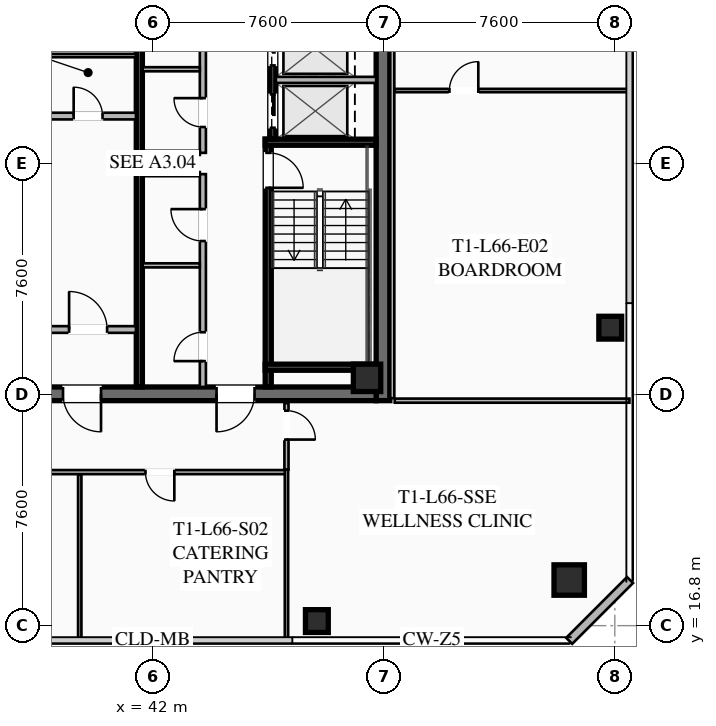
"""IFC4 building model, lengths in metres.
Left out: names, types, materials, properties, quantities, classifications, styles, units other than length and angle.
Written with IfcOpenShell. Run it as: python <this file> out.ifc"""

import sys

from ifc_helpers import new_model, si_unit, direction, frame, frame_2d, origin, origin_2d, place, context, subcontext, project, spatial, rectangle, hollow_rectangle, extrude, element, fill, save


model = new_model("IFC4")
c1 = context("Model", 3, precision=1e-05, world=origin(), true_north=direction((0.0, 1.0)))
c2 = subcontext(c1, "Body", "Model", "MODEL_VIEW")
j1 = project(units=[si_unit("LENGTHUNIT", "METRE"), si_unit("PLANEANGLEUNIT", "RADIAN")], contexts=[c1])
p1 = place(None, origin())
s1 = spatial("IfcSite", under=j1, at=p1, CompositionType="ELEMENT")
p2 = place(p1, origin())
s2 = spatial("IfcBuilding", under=s1, at=p2, CompositionType="ELEMENT")
p3 = place(p2, frame((0.0, 0.0, 243.25)))
s3 = spatial("IfcBuildingStorey", under=s2, at=p3, CompositionType="ELEMENT", Elevation=243.25)
p4 = place(p3, frame((49.575, 39.8, 0.0), z_axis=(0.0, 0.0, 1.0), x_axis=(0.0, -1.0, 0.0)))
e1 = element("IfcWall", 1, at=p4, inside=s3, PredefinedType="SHEAR", context=c2, shape_type="SweptSolid", body=[
    extrude(rectangle(XDim=15.6, YDim=0.45, at=frame_2d((7.8, 0.0))), origin(), (0.0, 0.0, 1.0), 3.55),
])
p5 = place(p3, frame((49.35, 24.425, 0.0), z_axis=(0.0, 0.0, 1.0), x_axis=(-1.0, 0.0, 0.0)))
e2 = element("IfcWall", 2, at=p5, inside=s3, PredefinedType="SHEAR", context=c2, shape_type="SweptSolid", body=[
    extrude(rectangle(XDim=14.7, YDim=0.45, at=frame_2d((7.35, 0.0))), origin(), (0.0, 0.0, 1.0), 3.55),
])
p6 = place(p5, frame((9.05, 0.0, 0.0)))
e3 = element("IfcOpeningElement", 3, at=p6, cuts=e2, PredefinedType="OPENING", context=c2, shape_type="SweptSolid", body=[
    extrude(rectangle(XDim=1.25, YDim=2.25, at=frame_2d((0.625, 1.125))), frame((0.0, 0.235, 0.0), z_axis=(0.0, -1.0, 0.0), x_axis=(1.0, 0.0, 0.0)), (0.0, 0.0, 1.0), 0.47),
])
p7 = place(p5, frame((4.0, 0.0, 0.0)))
e4 = element("IfcOpeningElement", 4, at=p7, cuts=e2, PredefinedType="OPENING", context=c2, shape_type="SweptSolid", body=[
    extrude(rectangle(XDim=1.25, YDim=2.25, at=frame_2d((0.625, 1.125))), frame((0.0, 0.235, 0.0), z_axis=(0.0, -1.0, 0.0), x_axis=(1.0, 0.0, 0.0)), (0.0, 0.0, 1.0), 0.47),
])
p8 = place(p3, frame((49.05, 24.95, 0.0), z_axis=(0.0, 0.0, 1.0), x_axis=(1.0, 0.0, 0.0)))
e5 = element("IfcColumn", 5, at=p8, inside=s3, PredefinedType="COLUMN", context=c2, shape_type="SweptSolid", body=[
    extrude(hollow_rectangle(XDim=0.9, YDim=0.9, WallThickness=0.04, at=origin_2d()), origin(), (0.0, 0.0, 1.0), 3.25),
])
p9 = place(p3, frame((55.7, 18.3, 0.0), z_axis=(0.0, 0.0, 1.0), x_axis=(1.0, 0.0, 0.0)))
e6 = element("IfcColumn", 6, at=p9, inside=s3, PredefinedType="COLUMN", context=c2, shape_type="SweptSolid", body=[
    extrude(hollow_rectangle(XDim=1.0, YDim=1.0, WallThickness=0.04, at=origin_2d()), origin(), (0.0, 0.0, 1.0), 3.25),
])
for number, where, z_axis, x_axis in (
    (7, (47.4, 16.95, 0.0), (0.0, 0.0, 1.0), (1.0, 0.0, 0.0)),
    (8, (57.05, 26.6, 0.0), (0.0, 0.0, 1.0), (1.0, 0.0, 0.0)),
):
    element("IfcColumn", number, at=place(p3, frame(where, z_axis=z_axis, x_axis=x_axis)), inside=s3, PredefinedType="COLUMN", context=c2, shape_type="SweptSolid", body=[
        extrude(hollow_rectangle(XDim=0.75, YDim=0.75, WallThickness=0.032, at=origin_2d()), origin(), (0.0, 0.0, 1.0), 3.25),
    ])
p10 = place(p3, frame((57.7, 18.3, 0.0), z_axis=(0.0, 0.0, 1.0), x_axis=(-0.707106781187, -0.707106781187, 0.0)))
e9 = element("IfcWall", 9, at=p10, inside=s3, PredefinedType="SOLIDWALL", context=c2, shape_type="SweptSolid", body=[
    extrude(rectangle(XDim=2.828, YDim=0.28, at=frame_2d((1.414, 0.0))), origin(), (0.0, 0.0, 1.0), 3.25),
])
p11 = place(p3, frame((45.8, 32.8, 0.0), z_axis=(0.0, 0.0, 1.0), x_axis=(0.0, -1.0, 0.0)))
e10 = element("IfcWall", 10, at=p11, inside=s3, PredefinedType="SHEAR", context=c2, shape_type="SweptSolid", body=[
    extrude(rectangle(XDim=8.15, YDim=0.2, at=frame_2d((4.075, 0.0))), origin(), (0.0, 0.0, 1.0), 3.25),
])
p12 = place(p11, frame((0.45, 0.0, 0.0)))
e11 = element("IfcOpeningElement", 11, at=p12, cuts=e10, PredefinedType="OPENING", context=c2, shape_type="SweptSolid", body=[
    extrude(rectangle(XDim=1.15, YDim=2.2, at=frame_2d((0.575, 1.1))), frame((0.0, 0.11, 0.0), z_axis=(0.0, -1.0, 0.0), x_axis=(1.0, 0.0, 0.0)), (0.0, 0.0, 1.0), 0.22),
])
for number, where, z_axis, x_axis in (
    (12, (45.7, 32.7, 0.0), (0.0, 0.0, 1.0), (1.0, 0.0, 0.0)),
    (13, (45.7, 25.3, 0.0), (0.0, 0.0, 1.0), (1.0, 0.0, 0.0)),
):
    element("IfcWall", number, at=place(p3, frame(where, z_axis=z_axis, x_axis=x_axis)), inside=s3, PredefinedType="SHEAR", context=c2, shape_type="SweptSolid", body=[
        extrude(rectangle(XDim=3.65, YDim=0.2, at=frame_2d((1.825, 0.0))), origin(), (0.0, 0.0, 1.0), 3.25),
    ])
p13 = place(p3, frame((41.56, 24.65, 0.0), z_axis=(0.0, 0.0, 1.0), x_axis=(0.0, 1.0, 0.0)))
e14 = element("IfcWall", 14, at=p13, inside=s3, PredefinedType="SHEAR", context=c2, shape_type="SweptSolid", body=[
    extrude(rectangle(XDim=14.7, YDim=0.2, at=frame_2d((7.35, 0.0))), origin(), (0.0, 0.0, 1.0), 3.25),
])
p14 = place(p3, frame((38.3, 33.56, 0.0), z_axis=(0.0, 0.0, 1.0), x_axis=(1.0, 0.0, 0.0)))
e15 = element("IfcWall", 15, at=p14, inside=s3, PredefinedType="SOLIDWALL", context=c2, shape_type="SweptSolid", body=[
    extrude(rectangle(XDim=3.15, YDim=0.22, at=frame_2d((1.575, 0.0))), origin(), (0.0, 0.0, 1.0), 2.393),
])
p15 = place(p14, frame((1.1, 0.0, 0.0)))
e16 = element("IfcOpeningElement", 16, at=p15, cuts=e15, PredefinedType="OPENING", context=c2, shape_type="SweptSolid", body=[
    extrude(rectangle(XDim=0.95, YDim=2.05, at=frame_2d((0.475, 1.025))), frame((0.0, 0.12, 0.0), z_axis=(0.0, -1.0, 0.0), x_axis=(1.0, 0.0, 0.0)), (0.0, 0.0, 1.0), 0.24),
])
p16 = place(p3, frame((38.3, 26.54, 0.0), z_axis=(0.0, 0.0, 1.0), x_axis=(1.0, 0.0, 0.0)))
e17 = element("IfcWall", 17, at=p16, inside=s3, PredefinedType="SOLIDWALL", context=c2, shape_type="SweptSolid", body=[
    extrude(rectangle(XDim=3.15, YDim=0.22, at=frame_2d((1.575, 0.0))), origin(), (0.0, 0.0, 1.0), 2.393),
])
p17 = place(p16, frame((0.95, 0.0, 0.0)))
e18 = element("IfcOpeningElement", 18, at=p17, cuts=e17, PredefinedType="OPENING", context=c2, shape_type="SweptSolid", body=[
    extrude(rectangle(XDim=1.25, YDim=2.25, at=frame_2d((0.625, 1.125))), frame((0.0, 0.12, 0.0), z_axis=(0.0, -1.0, 0.0), x_axis=(1.0, 0.0, 0.0)), (0.0, 0.0, 1.0), 0.24),
])
p18 = place(p3, frame((45.95, 39.35, 0.0), z_axis=(0.0, 0.0, 1.0), x_axis=(0.0, -1.0, 0.0)))
e19 = element("IfcWall", 19, at=p18, inside=s3, PredefinedType="SHEAR", context=c2, shape_type="SweptSolid", body=[
    extrude(rectangle(XDim=6.55, YDim=0.2, at=frame_2d((3.275, 0.0))), origin(), (0.0, 0.0, 1.0), 3.25),
])
p19 = place(p18, frame((5.075, 0.0, 0.0)))
e20 = element("IfcOpeningElement", 20, at=p19, cuts=e19, PredefinedType="OPENING", context=c2, shape_type="SweptSolid", body=[
    extrude(rectangle(XDim=1.1, YDim=2.2, at=frame_2d((0.55, 1.1))), frame((0.0, 0.11, 0.0), z_axis=(0.0, -1.0, 0.0), x_axis=(1.0, 0.0, 0.0)), (0.0, 0.0, 1.0), 0.22),
])
p20 = place(p18, frame((3.025, 0.0, 0.0)))
e21 = element("IfcOpeningElement", 21, at=p20, cuts=e19, PredefinedType="OPENING", context=c2, shape_type="SweptSolid", body=[
    extrude(rectangle(XDim=1.1, YDim=2.2, at=frame_2d((0.55, 1.1))), frame((0.0, 0.11, 0.0), z_axis=(0.0, -1.0, 0.0), x_axis=(1.0, 0.0, 0.0)), (0.0, 0.0, 1.0), 0.22),
])
p21 = place(p18, frame((1.025, 0.0, 0.0)))
e22 = element("IfcOpeningElement", 22, at=p21, cuts=e19, PredefinedType="OPENING", context=c2, shape_type="SweptSolid", body=[
    extrude(rectangle(XDim=1.1, YDim=2.2, at=frame_2d((0.55, 1.1))), frame((0.0, 0.11, 0.0), z_axis=(0.0, -1.0, 0.0), x_axis=(1.0, 0.0, 0.0)), (0.0, 0.0, 1.0), 0.22),
])
p22 = place(p3, frame((46.05, 34.75, 0.0), z_axis=(0.0, 0.0, 1.0), x_axis=(1.0, 0.0, 0.0)))
e23 = element("IfcWall", 23, at=p22, inside=s3, PredefinedType="SOLIDWALL", context=c2, shape_type="SweptSolid", body=[
    extrude(rectangle(XDim=3.3, YDim=0.2, at=frame_2d((1.65, 0.0))), origin(), (0.0, 0.0, 1.0), 3.25),
])
p23 = place(p3, frame((38.3, 35.55, 0.0), z_axis=(0.0, 0.0, 1.0), x_axis=(1.0, 0.0, 0.0)))
e24 = element("IfcWall", 24, at=p23, inside=s3, PredefinedType="PARTITIONING", context=c2, shape_type="SweptSolid", body=[
    extrude(rectangle(XDim=3.15, YDim=0.11, at=frame_2d((1.575, 0.0))), origin(), (0.0, 0.0, 1.0), 2.393),
])
p24 = place(p3, frame((43.65, 24.65, 0.0), z_axis=(0.0, 0.0, 1.0), x_axis=(0.0, 1.0, 0.0)))
e25 = element("IfcWall", 25, at=p24, inside=s3, PredefinedType="SOLIDWALL", context=c2, shape_type="SweptSolid", body=[
    extrude(rectangle(XDim=7.0, YDim=0.2, at=frame_2d((3.5, 0.0))), origin(), (0.0, 0.0, 1.0), 2.393),
])
p25 = place(p24, frame((0.85, 0.0, 0.0)))
e26 = element("IfcOpeningElement", 26, at=p25, cuts=e25, PredefinedType="OPENING", context=c2, shape_type="SweptSolid", body=[
    extrude(rectangle(XDim=0.95, YDim=2.05, at=frame_2d((0.475, 1.025))), frame((0.0, 0.11, 0.0), z_axis=(0.0, -1.0, 0.0), x_axis=(1.0, 0.0, 0.0)), (0.0, 0.0, 1.0), 0.22),
])
p26 = place(p24, frame((4.8, 0.0, 0.0)))
e27 = element("IfcOpeningElement", 27, at=p26, cuts=e25, PredefinedType="OPENING", context=c2, shape_type="SweptSolid", body=[
    extrude(rectangle(XDim=1.05, YDim=2.2, at=frame_2d((0.525, 1.1))), frame((0.0, 0.11, 0.0), z_axis=(0.0, -1.0, 0.0), x_axis=(1.0, 0.0, 0.0)), (0.0, 0.0, 1.0), 0.22),
])
for number, where, z_axis, x_axis in (
    (28, (41.67, 31.65, 0.0), (0.0, 0.0, 1.0), (1.0, 0.0, 0.0)),
    (29, (41.67, 28.65, 0.0), (0.0, 0.0, 1.0), (1.0, 0.0, 0.0)),
):
    element("IfcWall", number, at=place(p3, frame(where, z_axis=z_axis, x_axis=x_axis)), inside=s3, PredefinedType="PARTITIONING", context=c2, shape_type="SweptSolid", body=[
        extrude(rectangle(XDim=1.88, YDim=0.135, at=frame_2d((0.94, 0.0))), origin(), (0.0, 0.0, 1.0), 2.393),
    ])
p27 = place(p3, frame((43.65, 32.35, 0.0), z_axis=(0.0, 0.0, 1.0), x_axis=(0.0, 1.0, 0.0)))
e30 = element("IfcWall", 30, at=p27, inside=s3, PredefinedType="SOLIDWALL", context=c2, shape_type="SweptSolid", body=[
    extrude(rectangle(XDim=7.0, YDim=0.2, at=frame_2d((3.5, 0.0))), origin(), (0.0, 0.0, 1.0), 2.393),
])
p28 = place(p27, frame((0.85, 0.0, 0.0)))
e31 = element("IfcOpeningElement", 31, at=p28, cuts=e30, PredefinedType="OPENING", context=c2, shape_type="SweptSolid", body=[
    extrude(rectangle(XDim=0.95, YDim=2.05, at=frame_2d((0.475, 1.025))), frame((0.0, 0.11, 0.0), z_axis=(0.0, -1.0, 0.0), x_axis=(1.0, 0.0, 0.0)), (0.0, 0.0, 1.0), 0.22),
])
p29 = place(p27, frame((4.85, 0.0, 0.0)))
e32 = element("IfcOpeningElement", 32, at=p29, cuts=e30, PredefinedType="OPENING", context=c2, shape_type="SweptSolid", body=[
    extrude(rectangle(XDim=0.95, YDim=2.05, at=frame_2d((0.475, 1.025))), frame((0.0, 0.11, 0.0), z_axis=(0.0, -1.0, 0.0), x_axis=(1.0, 0.0, 0.0)), (0.0, 0.0, 1.0), 0.22),
])
for number, where, z_axis, x_axis in (
    (33, (41.67, 32.35, 0.0), (0.0, 0.0, 1.0), (1.0, 0.0, 0.0)),
    (34, (41.67, 35.1, 0.0), (0.0, 0.0, 1.0), (1.0, 0.0, 0.0)),
):
    element("IfcWall", number, at=place(p3, frame(where, z_axis=z_axis, x_axis=x_axis)), inside=s3, PredefinedType="PARTITIONING", context=c2, shape_type="SweptSolid", body=[
        extrude(rectangle(XDim=1.88, YDim=0.135, at=frame_2d((0.94, 0.0))), origin(), (0.0, 0.0, 1.0), 2.393),
    ])
p30 = place(p3, frame((46.4, 21.85, 0.0), z_axis=(0.0, 0.0, 1.0), x_axis=(-1.0, 0.0, 0.0)))
e35 = element("IfcWall", 35, at=p30, inside=s3, PredefinedType="PARTITIONING", context=c2, shape_type="SweptSolid", body=[
    extrude(rectangle(XDim=17.95, YDim=0.135, at=frame_2d((8.975, 0.0))), origin(), (0.0, 0.0, 1.0), 2.393),
])
p31 = place(p30, frame((16.62, 0.0, 0.0)))
e36 = element("IfcOpeningElement", 36, at=p31, cuts=e35, PredefinedType="OPENING", context=c2, shape_type="SweptSolid", body=[
    extrude(rectangle(XDim=0.95, YDim=2.05, at=frame_2d((0.475, 1.025))), frame((0.0, 0.077, 0.0), z_axis=(0.0, -1.0, 0.0), x_axis=(1.0, 0.0, 0.0)), (0.0, 0.0, 1.0), 0.155),
])
p32 = place(p30, frame((3.688, 0.0, 0.0)))
e37 = element("IfcOpeningElement", 37, at=p32, cuts=e35, PredefinedType="OPENING", context=c2, shape_type="SweptSolid", body=[
    extrude(rectangle(XDim=0.95, YDim=2.05, at=frame_2d((0.475, 1.025))), frame((0.0, 0.077, 0.0), z_axis=(0.0, -1.0, 0.0), x_axis=(1.0, 0.0, 0.0)), (0.0, 0.0, 1.0), 0.155),
])
p33 = place(p3, frame((46.4, 24.12, 0.0), z_axis=(0.0, 0.0, 1.0), x_axis=(0.0, -1.0, 0.0)))
e38 = element("IfcWall", 38, at=p33, inside=s3, PredefinedType="PARTITIONING", context=c2, shape_type="SweptSolid", body=[
    extrude(rectangle(XDim=2.19, YDim=0.135, at=frame_2d((1.095, 0.0))), origin(), (0.0, 0.0, 1.0), 2.393),
])
p34 = place(p33, frame((0.25, 0.0, 0.0)))
e39 = element("IfcOpeningElement", 39, at=p34, cuts=e38, PredefinedType="OPENING", context=c2, shape_type="SweptSolid", body=[
    extrude(rectangle(XDim=0.95, YDim=2.05, at=frame_2d((0.475, 1.025))), frame((0.0, 0.077, 0.0), z_axis=(0.0, -1.0, 0.0), x_axis=(1.0, 0.0, 0.0)), (0.0, 0.0, 1.0), 0.155),
])
p35 = place(p3, frame((39.6, 16.32, 0.0), z_axis=(0.0, 0.0, 1.0), x_axis=(0.0, 1.0, 0.0)))
e40 = element("IfcWall", 40, at=p35, inside=s3, PredefinedType="PARTITIONING", context=c2, shape_type="SweptSolid", body=[
    extrude(rectangle(XDim=5.45, YDim=0.11, at=frame_2d((2.725, 0.0))), origin(), (0.0, 0.0, 1.0), 2.393),
])
p36 = place(p3, frame((46.4, 16.32, 0.0), z_axis=(0.0, 0.0, 1.0), x_axis=(0.0, 1.0, 0.0)))
e41 = element("IfcWall", 41, at=p36, inside=s3, PredefinedType="PARTITIONING", context=c2, shape_type="SweptSolid", body=[
    extrude(rectangle(XDim=5.61, YDim=0.11, at=frame_2d((2.805, 0.0))), origin(), (0.0, 0.0, 1.0), 2.393),
])
p37 = place(p3, frame((49.88, 39.72, 0.0), z_axis=(0.0, 0.0, 1.0), x_axis=(0.0, -1.0, 0.0)))
e42 = element("IfcWall", 42, at=p37, inside=s3, PredefinedType="PARTITIONING", context=c2, shape_type="SweptSolid", body=[
    extrude(rectangle(XDim=15.44, YDim=0.135, at=frame_2d((7.72, 0.0))), origin(), (0.0, 0.0, 1.0), 2.393),
])
p38 = place(p3, frame((49.96, 24.2, 0.0), z_axis=(0.0, 0.0, 1.0), x_axis=(1.0, 0.0, 0.0)))
e43 = element("IfcWall", 43, at=p38, inside=s3, PredefinedType="PARTITIONING", context=c2, shape_type="SweptSolid", body=[
    extrude(rectangle(XDim=7.72, YDim=0.135, at=frame_2d((3.86, 0.0))), origin(), (0.0, 0.0, 1.0), 2.393),
])
p39 = place(p3, frame((49.96, 34.4, 0.0), z_axis=(0.0, 0.0, 1.0), x_axis=(1.0, 0.0, 0.0)))
e44 = element("IfcWall", 44, at=p39, inside=s3, PredefinedType="PARTITIONING", context=c2, shape_type="SweptSolid", body=[
    extrude(rectangle(XDim=7.72, YDim=0.11, at=frame_2d((3.86, 0.0))), origin(), (0.0, 0.0, 1.0), 2.393),
])
p40 = place(p39, frame((1.8, 0.0, 0.0)))
e45 = element("IfcOpeningElement", 45, at=p40, cuts=e44, PredefinedType="OPENING", context=c2, shape_type="SweptSolid", body=[
    extrude(rectangle(XDim=0.95, YDim=2.05, at=frame_2d((0.475, 1.025))), frame((0.0, 0.065, 0.0), z_axis=(0.0, -1.0, 0.0), x_axis=(1.0, 0.0, 0.0)), (0.0, 0.0, 1.0), 0.13),
])
p41 = place(p6, origin())
e46 = element("IfcDoor", 46, at=p41, inside=s3, OperationType="SINGLE_SWING_LEFT", PredefinedType="DOOR", context=c2, shape_type="SweptSolid", body=[
    extrude(rectangle(XDim=1.25, YDim=2.25, at=frame_2d((0.625, 1.125))), frame((0.0, 0.025, 0.0), z_axis=(0.0, -1.0, 0.0), x_axis=(1.0, 0.0, 0.0)), (0.0, 0.0, 1.0), 0.05),
])
fill(e3, e46)
p42 = place(p7, origin())
e47 = element("IfcDoor", 47, at=p42, inside=s3, OperationType="SINGLE_SWING_RIGHT", PredefinedType="DOOR", context=c2, shape_type="SweptSolid", body=[
    extrude(rectangle(XDim=1.25, YDim=2.25, at=frame_2d((0.625, 1.125))), frame((0.0, 0.025, 0.0), z_axis=(0.0, -1.0, 0.0), x_axis=(1.0, 0.0, 0.0)), (0.0, 0.0, 1.0), 0.05),
])
fill(e4, e47)
p43 = place(p12, origin())
e48 = element("IfcDoor", 48, at=p43, inside=s3, OperationType="SINGLE_SWING_RIGHT", PredefinedType="DOOR", context=c2, shape_type="SweptSolid", body=[
    extrude(rectangle(XDim=1.15, YDim=2.2, at=frame_2d((0.575, 1.1))), frame((0.0, 0.025, 0.0), z_axis=(0.0, -1.0, 0.0), x_axis=(1.0, 0.0, 0.0)), (0.0, 0.0, 1.0), 0.05),
])
fill(e11, e48)
p44 = place(p17, origin())
e49 = element("IfcDoor", 49, at=p44, inside=s3, OperationType="SINGLE_SWING_LEFT", PredefinedType="DOOR", context=c2, shape_type="SweptSolid", body=[
    extrude(rectangle(XDim=1.25, YDim=2.25, at=frame_2d((0.625, 1.125))), frame((0.0, 0.025, 0.0), z_axis=(0.0, -1.0, 0.0), x_axis=(1.0, 0.0, 0.0)), (0.0, 0.0, 1.0), 0.05),
])
fill(e18, e49)
p45 = place(p15, origin())
e50 = element("IfcDoor", 50, at=p45, inside=s3, OperationType="SINGLE_SWING_LEFT", PredefinedType="DOOR", context=c2, shape_type="SweptSolid", body=[
    extrude(rectangle(XDim=0.95, YDim=2.05, at=frame_2d((0.475, 1.025))), frame((0.0, 0.025, 0.0), z_axis=(0.0, -1.0, 0.0), x_axis=(1.0, 0.0, 0.0)), (0.0, 0.0, 1.0), 0.05),
])
fill(e16, e50)
p46 = place(p25, origin())
e51 = element("IfcDoor", 51, at=p46, inside=s3, OperationType="SINGLE_SWING_LEFT", PredefinedType="DOOR", context=c2, shape_type="SweptSolid", body=[
    extrude(rectangle(XDim=0.95, YDim=2.05, at=frame_2d((0.475, 1.025))), frame((0.0, 0.025, 0.0), z_axis=(0.0, -1.0, 0.0), x_axis=(1.0, 0.0, 0.0)), (0.0, 0.0, 1.0), 0.05),
])
fill(e26, e51)
p47 = place(p26, origin())
e52 = element("IfcDoor", 52, at=p47, inside=s3, OperationType="SINGLE_SWING_RIGHT", PredefinedType="DOOR", context=c2, shape_type="SweptSolid", body=[
    extrude(rectangle(XDim=1.05, YDim=2.2, at=frame_2d((0.525, 1.1))), frame((0.0, 0.025, 0.0), z_axis=(0.0, -1.0, 0.0), x_axis=(1.0, 0.0, 0.0)), (0.0, 0.0, 1.0), 0.05),
])
fill(e27, e52)
p48 = place(p28, origin())
e53 = element("IfcDoor", 53, at=p48, inside=s3, OperationType="SINGLE_SWING_RIGHT", PredefinedType="DOOR", context=c2, shape_type="SweptSolid", body=[
    extrude(rectangle(XDim=0.95, YDim=2.05, at=frame_2d((0.475, 1.025))), frame((0.0, 0.025, 0.0), z_axis=(0.0, -1.0, 0.0), x_axis=(1.0, 0.0, 0.0)), (0.0, 0.0, 1.0), 0.05),
])
fill(e31, e53)
p49 = place(p32, origin())
e54 = element("IfcDoor", 54, at=p49, inside=s3, OperationType="SINGLE_SWING_LEFT", PredefinedType="DOOR", context=c2, shape_type="SweptSolid", body=[
    extrude(rectangle(XDim=0.95, YDim=2.05, at=frame_2d((0.475, 1.025))), frame((0.0, 0.025, 0.0), z_axis=(0.0, -1.0, 0.0), x_axis=(1.0, 0.0, 0.0)), (0.0, 0.0, 1.0), 0.05),
])
fill(e37, e54)
p50 = place(p34, origin())
e55 = element("IfcDoor", 55, at=p50, inside=s3, OperationType="SINGLE_SWING_RIGHT", PredefinedType="DOOR", context=c2, shape_type="SweptSolid", body=[
    extrude(rectangle(XDim=0.95, YDim=2.05, at=frame_2d((0.475, 1.025))), frame((0.0, 0.025, 0.0), z_axis=(0.0, -1.0, 0.0), x_axis=(1.0, 0.0, 0.0)), (0.0, 0.0, 1.0), 0.05),
])
fill(e39, e55)
p51 = place(p40, origin())
e56 = element("IfcDoor", 56, at=p51, inside=s3, OperationType="SINGLE_SWING_RIGHT", PredefinedType="DOOR", context=c2, shape_type="SweptSolid", body=[
    extrude(rectangle(XDim=0.95, YDim=2.05, at=frame_2d((0.475, 1.025))), frame((0.0, 0.025, 0.0), z_axis=(0.0, -1.0, 0.0), x_axis=(1.0, 0.0, 0.0)), (0.0, 0.0, 1.0), 0.05),
])
fill(e45, e56)
p52 = place(p19, origin())
e57 = element("IfcDoor", 57, at=p52, inside=s3, OperationType="SLIDING_TO_LEFT", PredefinedType="DOOR", context=c2, shape_type="SweptSolid", body=[
    extrude(rectangle(XDim=1.1, YDim=2.2, at=frame_2d((0.55, 1.1))), frame((0.0, 0.025, 0.0), z_axis=(0.0, -1.0, 0.0), x_axis=(1.0, 0.0, 0.0)), (0.0, 0.0, 1.0), 0.05),
])
fill(e20, e57)
p53 = place(p20, origin())
e58 = element("IfcDoor", 58, at=p53, inside=s3, OperationType="SLIDING_TO_LEFT", PredefinedType="DOOR", context=c2, shape_type="SweptSolid", body=[
    extrude(rectangle(XDim=1.1, YDim=2.2, at=frame_2d((0.55, 1.1))), frame((0.0, 0.025, 0.0), z_axis=(0.0, -1.0, 0.0), x_axis=(1.0, 0.0, 0.0)), (0.0, 0.0, 1.0), 0.05),
])
fill(e21, e58)
save(model, sys.argv[1])
